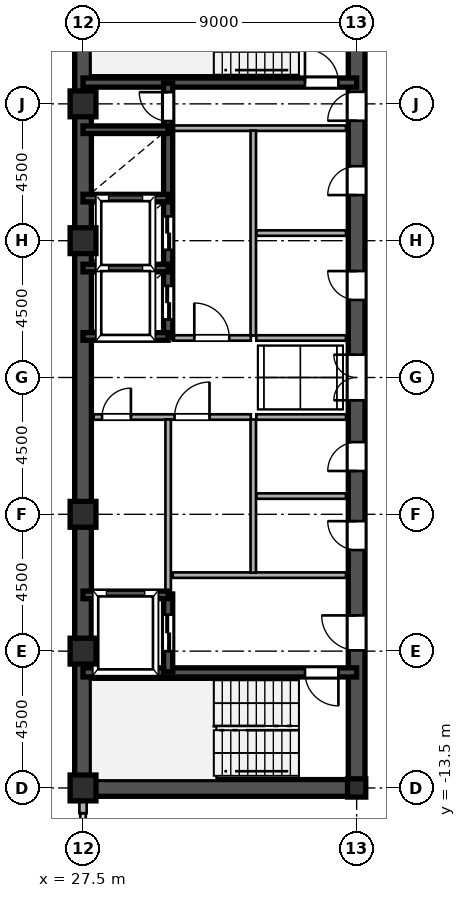
"""IFC4 building model, lengths in metres.
Left out: names, types, materials, properties, quantities, classifications, styles, units other than length and angle.
Written with IfcOpenShell. Run it as: python <this file> out.ifc"""

import sys

from ifc_helpers import new_model, si_unit, direction, frame, frame_2d, origin, origin_2d, place, context, subcontext, project, spatial, rectangle, hollow_rectangle, i_section, extrude, source, transform, mapped, element, fill, save


model = new_model("IFC4")
c1 = context("Model", 3, precision=1e-05, world=origin(), true_north=direction((0.0, 1.0)))
c2 = subcontext(c1, "Body", "Model", "MODEL_VIEW")
j1 = project(units=[si_unit("LENGTHUNIT", "METRE"), si_unit("PLANEANGLEUNIT", "RADIAN")], contexts=[c1])
p1 = place(None, origin())
s1 = spatial("IfcSite", under=j1, at=p1, CompositionType="ELEMENT")
p2 = place(p1, origin())
s2 = spatial("IfcBuilding", under=s1, at=p2, CompositionType="ELEMENT")
p3 = place(p2, frame((0.0, 0.0, 167.1)))
s3 = spatial("IfcBuildingStorey", under=s2, at=p3, CompositionType="ELEMENT", Elevation=167.1)
m1 = source(origin(), c2, "Body", "SweptSolid", [
    extrude(hollow_rectangle(XDim=0.85, YDim=0.85, WallThickness=0.036, at=origin_2d()), origin(), (0.0, 0.0, 1.0), 3.6),
])
for number, where, z_axis, x_axis in (
    (1, (27.5, -13.5, 0.0), (0.0, 0.0, 1.0), (1.0, 0.0, 0.0)),
    (2, (27.5, -9.0, 0.0), (0.0, 0.0, 1.0), (1.0, 0.0, 0.0)),
    (3, (27.5, -4.5, 0.0), (0.0, 0.0, 1.0), (1.0, 0.0, 0.0)),
    (4, (27.5, 4.5, 0.0), (0.0, 0.0, 1.0), (1.0, 0.0, 0.0)),
    (5, (27.5, 9.0, 0.0), (0.0, 0.0, 1.0), (1.0, 0.0, 0.0)),
):
    element("IfcColumn", number, at=place(p3, frame(where, z_axis=z_axis, x_axis=x_axis)), inside=s3, PredefinedType="COLUMN", context=c2, shape_type="MappedRepresentation", body=[
        mapped(m1, transform((0.0, 0.0, 0.0), scale=1.0)),
    ])
m2 = source(origin(), c2, "Body", "SweptSolid", [
    extrude(i_section(OverallWidth=0.6, OverallDepth=0.6, WebThickness=0.025, FlangeThickness=0.04, at=origin_2d()), origin(), (0.0, 0.0, 1.0), 3.6),
])
p4 = place(p3, frame((36.5, -13.5, 0.0), z_axis=(0.0, 0.0, 1.0), x_axis=(1.0, 0.0, 0.0)))
e6 = element("IfcColumn", 6, at=p4, inside=s3, PredefinedType="COLUMN", context=c2, shape_type="MappedRepresentation", body=[
    mapped(m2, transform((0.0, 0.0, 0.0), scale=1.0)),
])
p5 = place(p3, frame((27.5, -14.33, 0.0), z_axis=(0.0, 0.0, 1.0), x_axis=(0.0, 1.0, 0.0)))
e7 = element("IfcWall", 7, at=p5, inside=s3, PredefinedType="SOLIDWALL", context=c2, shape_type="SweptSolid", body=[
    extrude(rectangle(XDim=0.55, YDim=0.24, at=frame_2d((0.275, 0.0))), origin(), (0.0, 0.0, 1.0), 2.88),
])
for number, where, z_axis, x_axis in (
    (8, (27.5, -13.5, 0.0), (0.0, 0.0, 1.0), (0.0, 1.0, 0.0)),
    (9, (27.5, 1.3, 0.0), (0.0, 0.0, 1.0), (0.0, 1.0, 0.0)),
):
    element("IfcWall", number, at=place(p3, frame(where, z_axis=z_axis, x_axis=x_axis)), inside=s3, PredefinedType="SHEAR", context=c2, shape_type="SweptSolid", body=[
        extrude(rectangle(XDim=12.2, YDim=0.55, at=frame_2d((6.1, 0.0))), origin(), (0.0, 0.0, 1.0), 3.38),
    ])
p6 = place(p3, frame((27.5, -1.3, 0.0), z_axis=(0.0, 0.0, 1.0), x_axis=(0.0, 1.0, 0.0)))
e10 = element("IfcWall", 10, at=p6, inside=s3, PredefinedType="SHEAR", context=c2, shape_type="SweptSolid", body=[
    extrude(rectangle(XDim=2.6, YDim=0.55, at=frame_2d((1.3, 0.0))), origin(), (0.0, 0.0, 1.0), 3.38),
])
p7 = place(p3, frame((27.5, -13.5, 0.0), z_axis=(0.0, 0.0, 1.0), x_axis=(1.0, 0.0, 0.0)))
e11 = element("IfcWall", 11, at=p7, inside=s3, PredefinedType="SHEAR", context=c2, shape_type="SweptSolid", body=[
    extrude(rectangle(XDim=9.0, YDim=0.55, at=frame_2d((4.5, 0.0))), origin(), (0.0, 0.0, 1.0), 3.38),
])
p8 = place(p3, frame((36.5, -13.65, 0.0), z_axis=(0.0, 0.0, 1.0), x_axis=(0.0, 1.0, 0.0)))
e12 = element("IfcWall", 12, at=p8, inside=s3, PredefinedType="SHEAR", context=c2, shape_type="SweptSolid", body=[
    extrude(rectangle(XDim=7.15, YDim=0.55, at=frame_2d((3.575, 0.0))), origin(), (0.0, 0.0, 1.0), 3.38),
])
p9 = place(p8, frame((4.675, 0.0, 0.0)))
e13 = element("IfcOpeningElement", 13, at=p9, cuts=e12, PredefinedType="OPENING", context=c2, shape_type="SweptSolid", body=[
    extrude(rectangle(XDim=1.15, YDim=2.2, at=frame_2d((0.575, 1.1))), frame((0.0, 0.285, 0.0), z_axis=(0.0, -1.0, 0.0), x_axis=(1.0, 0.0, 0.0)), (0.0, 0.0, 1.0), 0.57),
])
p10 = place(p3, frame((36.5, -1.3, 0.0), z_axis=(0.0, 0.0, 1.0), x_axis=(0.0, 1.0, 0.0)))
e14 = element("IfcWall", 14, at=p10, inside=s3, PredefinedType="SHEAR", context=c2, shape_type="SweptSolid", body=[
    extrude(rectangle(XDim=2.6, YDim=0.55, at=frame_2d((1.3, 0.0))), origin(), (0.0, 0.0, 1.0), 3.38),
])
p11 = place(p10, frame((0.55, 0.0, 0.0)))
e15 = element("IfcOpeningElement", 15, at=p11, cuts=e14, PredefinedType="OPENING", context=c2, shape_type="SweptSolid", body=[
    extrude(rectangle(XDim=1.5, YDim=2.3, at=frame_2d((0.75, 1.15))), frame((0.0, 0.285, 0.0), z_axis=(0.0, -1.0, 0.0), x_axis=(1.0, 0.0, 0.0)), (0.0, 0.0, 1.0), 0.57),
])
p12 = place(p3, frame((36.5, 8.2, 0.0), z_axis=(0.0, 0.0, 1.0), x_axis=(0.0, 1.0, 0.0)))
e16 = element("IfcWall", 16, at=p12, inside=s3, PredefinedType="SHEAR", context=c2, shape_type="SweptSolid", body=[
    extrude(rectangle(XDim=5.45, YDim=0.55, at=frame_2d((2.725, 0.0))), origin(), (0.0, 0.0, 1.0), 3.38),
])
p13 = place(p12, frame((0.245, 0.0, 0.0)))
e17 = element("IfcOpeningElement", 17, at=p13, cuts=e16, PredefinedType="OPENING", context=c2, shape_type="SweptSolid", body=[
    extrude(rectangle(XDim=0.95, YDim=2.15, at=frame_2d((0.475, 1.075))), frame((0.0, 0.285, 0.0), z_axis=(0.0, -1.0, 0.0), x_axis=(1.0, 0.0, 0.0)), (0.0, 0.0, 1.0), 0.57),
])
p14 = place(p3, frame((36.5, -6.5, 0.0), z_axis=(0.0, 0.0, 1.0), x_axis=(0.0, 1.0, 0.0)))
e18 = element("IfcWall", 18, at=p14, inside=s3, PredefinedType="SHEAR", context=c2, shape_type="SweptSolid", body=[
    extrude(rectangle(XDim=2.6, YDim=0.55, at=frame_2d((1.3, 0.0))), origin(), (0.0, 0.0, 1.0), 3.38),
])
p15 = place(p14, frame((0.825, 0.0, 0.0)))
e19 = element("IfcOpeningElement", 19, at=p15, cuts=e18, PredefinedType="OPENING", context=c2, shape_type="SweptSolid", body=[
    extrude(rectangle(XDim=0.95, YDim=2.15, at=frame_2d((0.475, 1.075))), frame((0.0, 0.285, 0.0), z_axis=(0.0, -1.0, 0.0), x_axis=(1.0, 0.0, 0.0)), (0.0, 0.0, 1.0), 0.57),
])
p16 = place(p3, frame((36.5, -3.9, 0.0), z_axis=(0.0, 0.0, 1.0), x_axis=(0.0, 1.0, 0.0)))
e20 = element("IfcWall", 20, at=p16, inside=s3, PredefinedType="SHEAR", context=c2, shape_type="SweptSolid", body=[
    extrude(rectangle(XDim=2.6, YDim=0.55, at=frame_2d((1.3, 0.0))), origin(), (0.0, 0.0, 1.0), 3.38),
])
p17 = place(p16, frame((0.825, 0.0, 0.0)))
e21 = element("IfcOpeningElement", 21, at=p17, cuts=e20, PredefinedType="OPENING", context=c2, shape_type="SweptSolid", body=[
    extrude(rectangle(XDim=0.95, YDim=2.15, at=frame_2d((0.475, 1.075))), frame((0.0, 0.285, 0.0), z_axis=(0.0, -1.0, 0.0), x_axis=(1.0, 0.0, 0.0)), (0.0, 0.0, 1.0), 0.57),
])
p18 = place(p3, frame((36.5, 1.3, 0.0), z_axis=(0.0, 0.0, 1.0), x_axis=(0.0, 1.0, 0.0)))
e22 = element("IfcWall", 22, at=p18, inside=s3, PredefinedType="SHEAR", context=c2, shape_type="SweptSolid", body=[
    extrude(rectangle(XDim=3.45, YDim=0.55, at=frame_2d((1.725, 0.0))), origin(), (0.0, 0.0, 1.0), 3.38),
])
p19 = place(p18, frame((1.25, 0.0, 0.0)))
e23 = element("IfcOpeningElement", 23, at=p19, cuts=e22, PredefinedType="OPENING", context=c2, shape_type="SweptSolid", body=[
    extrude(rectangle(XDim=0.95, YDim=2.15, at=frame_2d((0.475, 1.075))), frame((0.0, 0.285, 0.0), z_axis=(0.0, -1.0, 0.0), x_axis=(1.0, 0.0, 0.0)), (0.0, 0.0, 1.0), 0.57),
])
p20 = place(p3, frame((36.5, 4.75, 0.0), z_axis=(0.0, 0.0, 1.0), x_axis=(0.0, 1.0, 0.0)))
e24 = element("IfcWall", 24, at=p20, inside=s3, PredefinedType="SHEAR", context=c2, shape_type="SweptSolid", body=[
    extrude(rectangle(XDim=3.45, YDim=0.55, at=frame_2d((1.725, 0.0))), origin(), (0.0, 0.0, 1.0), 3.38),
])
p21 = place(p20, frame((1.25, 0.0, 0.0)))
e25 = element("IfcOpeningElement", 25, at=p21, cuts=e24, PredefinedType="OPENING", context=c2, shape_type="SweptSolid", body=[
    extrude(rectangle(XDim=0.95, YDim=2.15, at=frame_2d((0.475, 1.075))), frame((0.0, 0.285, 0.0), z_axis=(0.0, -1.0, 0.0), x_axis=(1.0, 0.0, 0.0)), (0.0, 0.0, 1.0), 0.57),
])
p22 = place(p3, frame((27.5, -9.7, 0.0), z_axis=(0.0, 0.0, 1.0), x_axis=(1.0, 0.0, 0.0)))
e26 = element("IfcWall", 26, at=p22, inside=s3, PredefinedType="SHEAR", context=c2, shape_type="SweptSolid", body=[
    extrude(rectangle(XDim=9.0, YDim=0.3, at=frame_2d((4.5, 0.0))), origin(), (0.0, 0.0, 1.0), 3.38),
])
p23 = place(p22, frame((7.3, 0.0, 0.0)))
e27 = element("IfcOpeningElement", 27, at=p23, cuts=e26, PredefinedType="OPENING", context=c2, shape_type="SweptSolid", body=[
    extrude(rectangle(XDim=1.1, YDim=2.2, at=frame_2d((0.55, 1.1))), frame((0.0, 0.16, 0.0), z_axis=(0.0, -1.0, 0.0), x_axis=(1.0, 0.0, 0.0)), (0.0, 0.0, 1.0), 0.32),
])
p24 = place(p3, frame((27.5, 9.7, 0.0), z_axis=(0.0, 0.0, 1.0), x_axis=(1.0, 0.0, 0.0)))
e28 = element("IfcWall", 28, at=p24, inside=s3, PredefinedType="SHEAR", context=c2, shape_type="SweptSolid", body=[
    extrude(rectangle(XDim=9.0, YDim=0.3, at=frame_2d((4.5, 0.0))), origin(), (0.0, 0.0, 1.0), 3.38),
])
p25 = place(p24, frame((7.3, 0.0, 0.0)))
e29 = element("IfcOpeningElement", 29, at=p25, cuts=e28, PredefinedType="OPENING", context=c2, shape_type="SweptSolid", body=[
    extrude(rectangle(XDim=1.1, YDim=2.2, at=frame_2d((0.55, 1.1))), frame((0.0, 0.16, 0.0), z_axis=(0.0, -1.0, 0.0), x_axis=(1.0, 0.0, 0.0)), (0.0, 0.0, 1.0), 0.32),
])
for number, where, z_axis, x_axis in (
    (30, (27.5, -7.15, 0.0), (0.0, 0.0, 1.0), (1.0, 0.0, 0.0)),
    (31, (27.5, 1.35, 0.0), (0.0, 0.0, 1.0), (1.0, 0.0, 0.0)),
    (32, (27.5, 3.6, 0.0), (0.0, 0.0, 1.0), (1.0, 0.0, 0.0)),
    (33, (27.5, 5.9, 0.0), (0.0, 0.0, 1.0), (1.0, 0.0, 0.0)),
    (34, (27.5, 8.15, 0.0), (0.0, 0.0, 1.0), (1.0, 0.0, 0.0)),
):
    element("IfcWall", number, at=place(p3, frame(where, z_axis=z_axis, x_axis=x_axis)), inside=s3, PredefinedType="SHEAR", context=c2, shape_type="SweptSolid", body=[
        extrude(rectangle(XDim=2.8, YDim=0.25, at=frame_2d((1.4, 0.0))), origin(), (0.0, 0.0, 1.0), 3.38),
    ])
p26 = place(p3, frame((30.3, -9.68, 0.0), z_axis=(0.0, 0.0, 1.0), x_axis=(0.0, 1.0, 0.0)))
e35 = element("IfcWall", 35, at=p26, inside=s3, PredefinedType="SHEAR", context=c2, shape_type="SweptSolid", body=[
    extrude(rectangle(XDim=2.56, YDim=0.3, at=frame_2d((1.28, 0.0))), origin(), (0.0, 0.0, 1.0), 3.38),
])
p27 = place(p26, frame((0.68, 0.0, 0.0)))
e36 = element("IfcOpeningElement", 36, at=p27, cuts=e35, PredefinedType="OPENING", context=c2, shape_type="SweptSolid", body=[
    extrude(rectangle(XDim=1.2, YDim=2.25, at=frame_2d((0.6, 1.125))), frame((0.0, 0.16, 0.0), z_axis=(0.0, -1.0, 0.0), x_axis=(1.0, 0.0, 0.0)), (0.0, 0.0, 1.0), 0.32),
])
p28 = place(p3, frame((30.3, 1.32, 0.0), z_axis=(0.0, 0.0, 1.0), x_axis=(0.0, 1.0, 0.0)))
e37 = element("IfcWall", 37, at=p28, inside=s3, PredefinedType="SHEAR", context=c2, shape_type="SweptSolid", body=[
    extrude(rectangle(XDim=2.28, YDim=0.3, at=frame_2d((1.14, 0.0))), origin(), (0.0, 0.0, 1.0), 3.38),
])
p29 = place(p28, frame((0.59, 0.0, 0.0)))
e38 = element("IfcOpeningElement", 38, at=p29, cuts=e37, PredefinedType="OPENING", context=c2, shape_type="SweptSolid", body=[
    extrude(rectangle(XDim=1.1, YDim=2.2, at=frame_2d((0.55, 1.1))), frame((0.0, 0.16, 0.0), z_axis=(0.0, -1.0, 0.0), x_axis=(1.0, 0.0, 0.0)), (0.0, 0.0, 1.0), 0.32),
])
p30 = place(p3, frame((30.3, 3.6, 0.0), z_axis=(0.0, 0.0, 1.0), x_axis=(0.0, 1.0, 0.0)))
e39 = element("IfcWall", 39, at=p30, inside=s3, PredefinedType="SHEAR", context=c2, shape_type="SweptSolid", body=[
    extrude(rectangle(XDim=2.3, YDim=0.3, at=frame_2d((1.15, 0.0))), origin(), (0.0, 0.0, 1.0), 3.38),
])
p31 = place(p30, frame((0.6, 0.0, 0.0)))
e40 = element("IfcOpeningElement", 40, at=p31, cuts=e39, PredefinedType="OPENING", context=c2, shape_type="SweptSolid", body=[
    extrude(rectangle(XDim=1.1, YDim=2.2, at=frame_2d((0.55, 1.1))), frame((0.0, 0.16, 0.0), z_axis=(0.0, -1.0, 0.0), x_axis=(1.0, 0.0, 0.0)), (0.0, 0.0, 1.0), 0.32),
])
p32 = place(p3, frame((30.3, 5.9, 0.0), z_axis=(0.0, 0.0, 1.0), x_axis=(0.0, 1.0, 0.0)))
e41 = element("IfcWall", 41, at=p32, inside=s3, PredefinedType="SHEAR", context=c2, shape_type="SweptSolid", body=[
    extrude(rectangle(XDim=2.25, YDim=0.3, at=frame_2d((1.125, 0.0))), origin(), (0.0, 0.0, 1.0), 3.38),
])
p33 = place(p3, frame((30.3, 8.15, 0.0), z_axis=(0.0, 0.0, 1.0), x_axis=(0.0, 1.0, 0.0)))
e42 = element("IfcWall", 42, at=p33, inside=s3, PredefinedType="SHEAR", context=c2, shape_type="SweptSolid", body=[
    extrude(rectangle(XDim=1.53, YDim=0.3, at=frame_2d((0.765, 0.0))), origin(), (0.0, 0.0, 1.0), 3.38),
])
p34 = place(p33, frame((0.285, 0.0, 0.0)))
e43 = element("IfcOpeningElement", 43, at=p34, cuts=e42, PredefinedType="OPENING", context=c2, shape_type="SweptSolid", body=[
    extrude(rectangle(XDim=0.95, YDim=2.15, at=frame_2d((0.475, 1.075))), frame((0.0, 0.16, 0.0), z_axis=(0.0, -1.0, 0.0), x_axis=(1.0, 0.0, 0.0)), (0.0, 0.0, 1.0), 0.32),
])
for number, where, z_axis, x_axis in (
    (44, (30.45, -6.5, 0.0), (0.0, 0.0, 1.0), (1.0, 0.0, 0.0)),
    (45, (30.45, 8.2, 0.0), (0.0, 0.0, 1.0), (1.0, 0.0, 0.0)),
):
    element("IfcWall", number, at=place(p3, frame(where, z_axis=z_axis, x_axis=x_axis)), inside=s3, PredefinedType="PARTITIONING", context=c2, shape_type="SweptSolid", body=[
        extrude(rectangle(XDim=5.7, YDim=0.18, at=frame_2d((2.85, 0.0))), origin(), (0.0, 0.0, 1.0), 3.38),
    ])
p35 = place(p3, frame((33.1, -6.42, 0.0), z_axis=(0.0, 0.0, 1.0), x_axis=(0.0, 1.0, 0.0)))
e46 = element("IfcWall", 46, at=p35, inside=s3, PredefinedType="PARTITIONING", context=c2, shape_type="SweptSolid", body=[
    extrude(rectangle(XDim=5.04, YDim=0.18, at=frame_2d((2.52, 0.0))), origin(), (0.0, 0.0, 1.0), 3.38),
])
p36 = place(p3, frame((33.1, 1.38, 0.0), z_axis=(0.0, 0.0, 1.0), x_axis=(0.0, 1.0, 0.0)))
e47 = element("IfcWall", 47, at=p36, inside=s3, PredefinedType="PARTITIONING", context=c2, shape_type="SweptSolid", body=[
    extrude(rectangle(XDim=6.74, YDim=0.18, at=frame_2d((3.37, 0.0))), origin(), (0.0, 0.0, 1.0), 3.38),
])
p37 = place(p3, frame((27.85, -1.3, 0.0), z_axis=(0.0, 0.0, 1.0), x_axis=(1.0, 0.0, 0.0)))
e48 = element("IfcWall", 48, at=p37, inside=s3, PredefinedType="PARTITIONING", context=c2, shape_type="SweptSolid", body=[
    extrude(rectangle(XDim=2.45, YDim=0.18, at=frame_2d((1.225, 0.0))), origin(), (0.0, 0.0, 1.0), 3.38),
])
p38 = place(p37, frame((0.275, 0.0, 0.0)))
e49 = element("IfcOpeningElement", 49, at=p38, cuts=e48, PredefinedType="OPENING", context=c2, shape_type="SweptSolid", body=[
    extrude(rectangle(XDim=0.95, YDim=2.15, at=frame_2d((0.475, 1.075))), frame((0.0, 0.1, 0.0), z_axis=(0.0, -1.0, 0.0), x_axis=(1.0, 0.0, 0.0)), (0.0, 0.0, 1.0), 0.2),
])
p39 = place(p3, frame((30.3, -1.3, 0.0), z_axis=(0.0, 0.0, 1.0), x_axis=(1.0, 0.0, 0.0)))
e50 = element("IfcWall", 50, at=p39, inside=s3, PredefinedType="PARTITIONING", context=c2, shape_type="SweptSolid", body=[
    extrude(rectangle(XDim=2.72, YDim=0.18, at=frame_2d((1.36, 0.0))), origin(), (0.0, 0.0, 1.0), 3.38),
])
p40 = place(p39, frame((0.21, 0.0, 0.0)))
e51 = element("IfcOpeningElement", 51, at=p40, cuts=e50, PredefinedType="OPENING", context=c2, shape_type="SweptSolid", body=[
    extrude(rectangle(XDim=1.15, YDim=2.2, at=frame_2d((0.575, 1.1))), frame((0.0, 0.1, 0.0), z_axis=(0.0, -1.0, 0.0), x_axis=(1.0, 0.0, 0.0)), (0.0, 0.0, 1.0), 0.2),
])
p41 = place(p3, frame((30.3, -7.12, 0.0), z_axis=(0.0, 0.0, 1.0), x_axis=(0.0, 1.0, 0.0)))
e52 = element("IfcWall", 52, at=p41, inside=s3, PredefinedType="PARTITIONING", context=c2, shape_type="SweptSolid", body=[
    extrude(rectangle(XDim=5.74, YDim=0.18, at=frame_2d((2.87, 0.0))), origin(), (0.0, 0.0, 1.0), 3.38),
])
p42 = place(p3, frame((30.45, 1.3, 0.0), z_axis=(0.0, 0.0, 1.0), x_axis=(1.0, 0.0, 0.0)))
e53 = element("IfcWall", 53, at=p42, inside=s3, PredefinedType="PARTITIONING", context=c2, shape_type="SweptSolid", body=[
    extrude(rectangle(XDim=2.57, YDim=0.18, at=frame_2d((1.285, 0.0))), origin(), (0.0, 0.0, 1.0), 3.38),
])
p43 = place(p42, frame((0.71, 0.0, 0.0)))
e54 = element("IfcOpeningElement", 54, at=p43, cuts=e53, PredefinedType="OPENING", context=c2, shape_type="SweptSolid", body=[
    extrude(rectangle(XDim=1.15, YDim=2.2, at=frame_2d((0.575, 1.1))), frame((0.0, 0.1, 0.0), z_axis=(0.0, -1.0, 0.0), x_axis=(1.0, 0.0, 0.0)), (0.0, 0.0, 1.0), 0.2),
])
for number, where, z_axis, x_axis in (
    (55, (33.2, -1.3, 0.0), (0.0, 0.0, 1.0), (1.0, 0.0, 0.0)),
    (56, (33.2, 1.3, 0.0), (0.0, 0.0, 1.0), (1.0, 0.0, 0.0)),
    (57, (33.2, -3.9, 0.0), (0.0, 0.0, 1.0), (1.0, 0.0, 0.0)),
    (58, (33.2, 4.75, 0.0), (0.0, 0.0, 1.0), (1.0, 0.0, 0.0)),
):
    element("IfcWall", number, at=place(p3, frame(where, z_axis=z_axis, x_axis=x_axis)), inside=s3, PredefinedType="PARTITIONING", context=c2, shape_type="SweptSolid", body=[
        extrude(rectangle(XDim=2.95, YDim=0.18, at=frame_2d((1.475, 0.0))), origin(), (0.0, 0.0, 1.0), 3.38),
    ])
m3 = source(origin(), c2, "Body", "SweptSolid", [
    extrude(rectangle(XDim=1.15, YDim=2.2, at=frame_2d((0.575, 1.1))), frame((0.0, 0.025, 0.0), z_axis=(0.0, -1.0, 0.0), x_axis=(1.0, 0.0, 0.0)), (0.0, 0.0, 1.0), 0.05),
])
p44 = place(p9, origin())
e59 = element("IfcDoor", 59, at=p44, inside=s3, OperationType="SINGLE_SWING_RIGHT", PredefinedType="DOOR", context=c2, shape_type="MappedRepresentation", body=[
    mapped(m3, transform((0.0, 0.0, 0.0), scale=1.0)),
])
fill(e13, e59)
m4 = source(origin(), c2, "Body", "SweptSolid", [
    extrude(rectangle(XDim=1.5, YDim=2.3, at=frame_2d((0.75, 1.15))), frame((0.0, 0.025, 0.0), z_axis=(0.0, -1.0, 0.0), x_axis=(1.0, 0.0, 0.0)), (0.0, 0.0, 1.0), 0.05),
])
p45 = place(p11, origin())
e60 = element("IfcDoor", 60, at=p45, inside=s3, OperationType="DOUBLE_SWING_LEFT", PredefinedType="DOOR", context=c2, shape_type="MappedRepresentation", body=[
    mapped(m4, transform((0.0, 0.0, 0.0), scale=1.0)),
])
fill(e15, e60)
m5 = source(origin(), c2, "Body", "SweptSolid", [
    extrude(rectangle(XDim=0.95, YDim=2.15, at=frame_2d((0.475, 1.075))), frame((0.0, 0.025, 0.0), z_axis=(0.0, -1.0, 0.0), x_axis=(1.0, 0.0, 0.0)), (0.0, 0.0, 1.0), 0.05),
])
p46 = place(p13, origin())
e61 = element("IfcDoor", 61, at=p46, inside=s3, OperationType="SINGLE_SWING_LEFT", PredefinedType="DOOR", context=c2, shape_type="MappedRepresentation", body=[
    mapped(m5, transform((0.0, 0.0, 0.0), scale=1.0)),
])
fill(e17, e61)
p47 = place(p15, origin())
e62 = element("IfcDoor", 62, at=p47, inside=s3, OperationType="SINGLE_SWING_RIGHT", PredefinedType="DOOR", context=c2, shape_type="MappedRepresentation", body=[
    mapped(m5, transform((0.0, 0.0, 0.0), scale=1.0)),
])
fill(e19, e62)
p48 = place(p17, origin())
e63 = element("IfcDoor", 63, at=p48, inside=s3, OperationType="SINGLE_SWING_LEFT", PredefinedType="DOOR", context=c2, shape_type="MappedRepresentation", body=[
    mapped(m5, transform((0.0, 0.0, 0.0), scale=1.0)),
])
fill(e21, e63)
p49 = place(p19, origin())
e64 = element("IfcDoor", 64, at=p49, inside=s3, OperationType="SINGLE_SWING_RIGHT", PredefinedType="DOOR", context=c2, shape_type="MappedRepresentation", body=[
    mapped(m5, transform((0.0, 0.0, 0.0), scale=1.0)),
])
fill(e23, e64)
p50 = place(p21, origin())
e65 = element("IfcDoor", 65, at=p50, inside=s3, OperationType="SINGLE_SWING_LEFT", PredefinedType="DOOR", context=c2, shape_type="MappedRepresentation", body=[
    mapped(m5, transform((0.0, 0.0, 0.0), scale=1.0)),
])
fill(e25, e65)
m6 = source(origin(), c2, "Body", "SweptSolid", [
    extrude(rectangle(XDim=1.1, YDim=2.2, at=frame_2d((0.55, 1.1))), frame((0.0, 0.025, 0.0), z_axis=(0.0, -1.0, 0.0), x_axis=(1.0, 0.0, 0.0)), (0.0, 0.0, 1.0), 0.05),
])
p51 = place(p23, frame((1.1, 0.0, 0.0), z_axis=(0.0, 0.0, 1.0), x_axis=(-1.0, 0.0, 0.0)))
e66 = element("IfcDoor", 66, at=p51, inside=s3, OperationType="SINGLE_SWING_RIGHT", PredefinedType="DOOR", context=c2, shape_type="MappedRepresentation", body=[
    mapped(m6, transform((0.0, 0.0, 0.0), scale=1.0)),
])
fill(e27, e66)
p52 = place(p25, origin())
e67 = element("IfcDoor", 67, at=p52, inside=s3, OperationType="SINGLE_SWING_LEFT", PredefinedType="DOOR", context=c2, shape_type="MappedRepresentation", body=[
    mapped(m6, transform((0.0, 0.0, 0.0), scale=1.0)),
])
fill(e29, e67)
m7 = source(origin(), c2, "Body", "SweptSolid", [
    extrude(rectangle(XDim=1.2, YDim=2.25, at=frame_2d((0.6, 1.125))), frame((0.0, 0.025, 0.0), z_axis=(0.0, -1.0, 0.0), x_axis=(1.0, 0.0, 0.0)), (0.0, 0.0, 1.0), 0.05),
])
p53 = place(p27, origin())
e68 = element("IfcDoor", 68, at=p53, inside=s3, OperationType="DOUBLE_DOOR_SLIDING", PredefinedType="DOOR", context=c2, shape_type="MappedRepresentation", body=[
    mapped(m7, transform((0.0, 0.0, 0.0), scale=1.0)),
])
fill(e36, e68)
m8 = source(origin(), c2, "Body", "SweptSolid", [
    extrude(rectangle(XDim=1.1, YDim=2.2, at=frame_2d((0.55, 1.1))), frame((0.0, 0.025, 0.0), z_axis=(0.0, -1.0, 0.0), x_axis=(1.0, 0.0, 0.0)), (0.0, 0.0, 1.0), 0.05),
])
p54 = place(p29, origin())
e69 = element("IfcDoor", 69, at=p54, inside=s3, OperationType="DOUBLE_DOOR_SLIDING", PredefinedType="DOOR", context=c2, shape_type="MappedRepresentation", body=[
    mapped(m8, transform((0.0, 0.0, 0.0), scale=1.0)),
])
fill(e38, e69)
p55 = place(p31, origin())
e70 = element("IfcDoor", 70, at=p55, inside=s3, OperationType="DOUBLE_DOOR_SLIDING", PredefinedType="DOOR", context=c2, shape_type="MappedRepresentation", body=[
    mapped(m8, transform((0.0, 0.0, 0.0), scale=1.0)),
])
fill(e40, e70)
p56 = place(p34, origin())
e71 = element("IfcDoor", 71, at=p56, inside=s3, OperationType="SINGLE_SWING_RIGHT", PredefinedType="DOOR", context=c2, shape_type="MappedRepresentation", body=[
    mapped(m5, transform((0.0, 0.0, 0.0), scale=1.0)),
])
fill(e43, e71)
p57 = place(p38, origin())
e72 = element("IfcDoor", 72, at=p57, inside=s3, OperationType="SINGLE_SWING_RIGHT", PredefinedType="DOOR", context=c2, shape_type="MappedRepresentation", body=[
    mapped(m5, transform((0.0, 0.0, 0.0), scale=1.0)),
])
fill(e49, e72)
p58 = place(p40, origin())
e73 = element("IfcDoor", 73, at=p58, inside=s3, OperationType="SINGLE_SWING_RIGHT", PredefinedType="DOOR", context=c2, shape_type="MappedRepresentation", body=[
    mapped(m3, transform((0.0, 0.0, 0.0), scale=1.0)),
])
fill(e51, e73)
p59 = place(p43, origin())
e74 = element("IfcDoor", 74, at=p59, inside=s3, OperationType="SINGLE_SWING_LEFT", PredefinedType="DOOR", context=c2, shape_type="MappedRepresentation", body=[
    mapped(m3, transform((0.0, 0.0, 0.0), scale=1.0)),
])
fill(e54, e74)
save(model, sys.argv[1])
